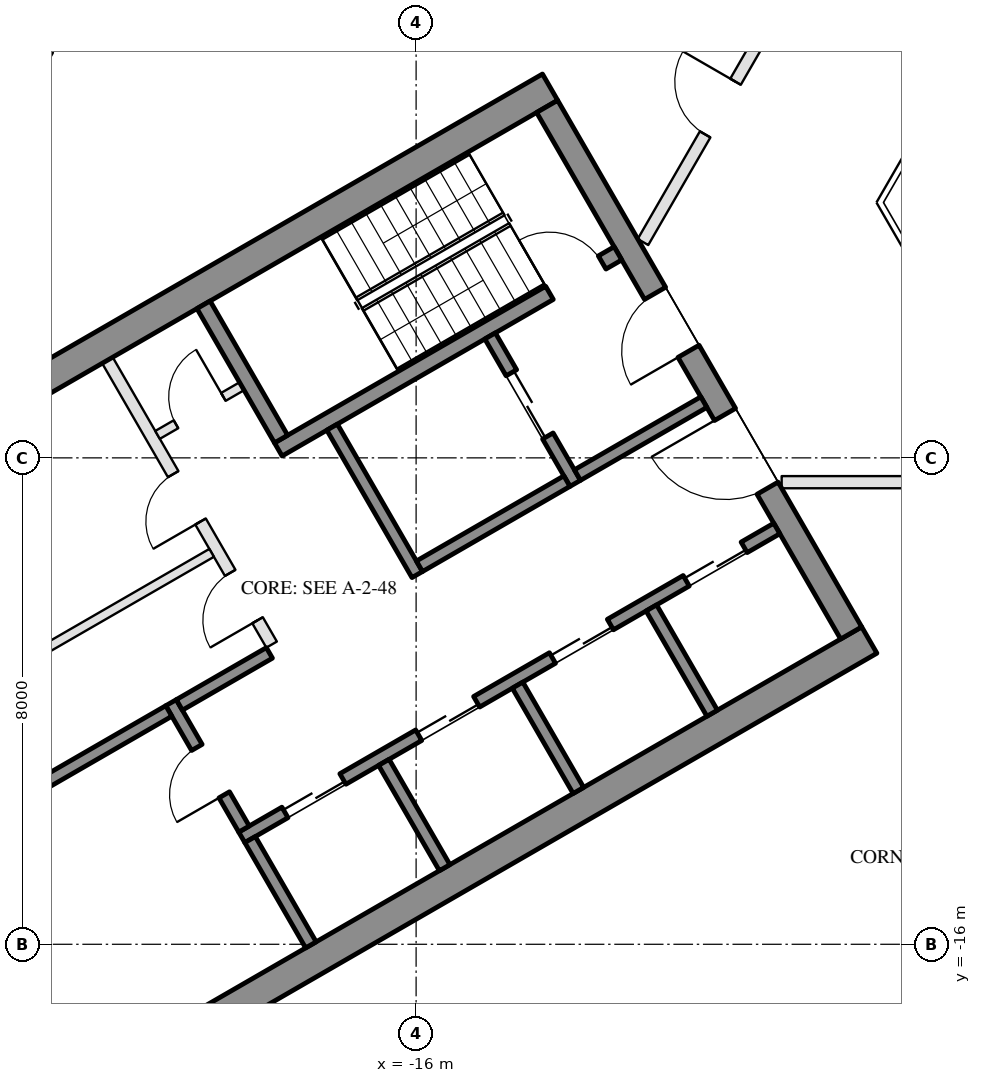
"""IFC4 building model, lengths in metres.
Left out: names, types, materials, properties, quantities, classifications, styles, units other than length and angle.
Written with IfcOpenShell. Run it as: python <this file> out.ifc"""

import sys

from ifc_helpers import new_model, si_unit, direction, frame, frame_2d, origin, place, context, subcontext, project, spatial, rectangle, extrude, element, fill, save


model = new_model("IFC4")
c1 = context("Model", 3, precision=1e-05, world=origin(), true_north=direction((0.0, 1.0)))
c2 = subcontext(c1, "Body", "Model", "MODEL_VIEW")
j1 = project(units=[si_unit("LENGTHUNIT", "METRE"), si_unit("PLANEANGLEUNIT", "RADIAN")], contexts=[c1])
p1 = place(None, origin())
s1 = spatial("IfcSite", under=j1, at=p1, CompositionType="ELEMENT")
p2 = place(p1, origin())
s2 = spatial("IfcBuilding", under=s1, at=p2, CompositionType="ELEMENT")
p3 = place(p2, frame((0.0, 0.0, 209.5)))
s3 = spatial("IfcBuildingStorey", under=s2, at=p3, CompositionType="ELEMENT", Elevation=209.5)
p4 = place(p3, frame((-20.309, 1.934, 0.0), z_axis=(0.0, 0.0, 1.0), x_axis=(-0.499992114976, -0.866029956157, 0.0)))
e1 = element("IfcWall", 1, at=p4, inside=s3, PredefinedType="SOLIDWALL", context=c2, shape_type="SweptSolid", body=[
    extrude(rectangle(XDim=6.74, YDim=0.35, at=frame_2d((3.37, 0.0))), origin(), (0.0, 0.0, 1.0), 3.55),
])
p5 = place(p4, frame((4.02, 0.0, 0.0)))
e2 = element("IfcOpeningElement", 2, at=p5, cuts=e1, PredefinedType="OPENING", context=c2, shape_type="SweptSolid", body=[
    extrude(rectangle(XDim=2.4, YDim=2.4, at=frame_2d((1.2, 1.2))), frame((0.0, 0.185, 0.0), z_axis=(0.0, -1.0, 0.0), x_axis=(1.0, 0.0, 0.0)), (0.0, 0.0, 1.0), 0.37),
])
p6 = place(p4, frame((0.77, 0.0, 0.3)))
e3 = element("IfcOpeningElement", 3, at=p6, cuts=e1, PredefinedType="OPENING", context=c2, shape_type="SweptSolid", body=[
    extrude(rectangle(XDim=2.9, YDim=2.65, at=frame_2d((1.45, 1.325))), frame((0.0, 0.185, 0.0), z_axis=(0.0, -1.0, 0.0), x_axis=(1.0, 0.0, 0.0)), (0.0, 0.0, 1.0), 0.37),
])
for number, where, z_axis, x_axis in (
    (4, (-13.797, -1.903, 0.0), (0.0, 0.0, 1.0), (-0.866, -0.5, 0.0)),
    (5, (-8.547, -10.997, 0.0), (0.0, 0.0, 1.0), (-0.866, -0.5, 0.0)),
):
    element("IfcWall", number, at=place(p3, frame(where, z_axis=z_axis, x_axis=x_axis)), inside=s3, PredefinedType="SHEAR", context=c2, shape_type="SweptSolid", body=[
        extrude(rectangle(XDim=14.837, YDim=0.5, at=frame_2d((7.418, 0.0))), origin(), (0.0, 0.0, 1.0), 3.5),
    ])
p7 = place(p3, frame((-13.845, -2.22, 0.0), z_axis=(0.0, 0.0, 1.0), x_axis=(0.500004234368, -0.866022959057, 0.0)))
e6 = element("IfcWall", 6, at=p7, inside=s3, PredefinedType="SHEAR", context=c2, shape_type="SweptSolid", body=[
    extrude(rectangle(XDim=10.0, YDim=0.4, at=frame_2d((5.0, 0.0))), origin(), (0.0, 0.0, 1.0), 3.5),
])
p8 = place(p7, frame((3.55, 0.0, 0.0)))
e7 = element("IfcOpeningElement", 7, at=p8, cuts=e6, PredefinedType="OPENING", context=c2, shape_type="SweptSolid", body=[
    extrude(rectangle(XDim=1.1, YDim=2.1, at=frame_2d((0.55, 1.05))), frame((0.0, 0.21, 0.0), z_axis=(0.0, -1.0, 0.0), x_axis=(1.0, 0.0, 0.0)), (0.0, 0.0, 1.0), 0.42),
])
p9 = place(p7, frame((5.85, 0.0, 0.0)))
e8 = element("IfcOpeningElement", 8, at=p9, cuts=e6, PredefinedType="OPENING", context=c2, shape_type="SweptSolid", body=[
    extrude(rectangle(XDim=1.4, YDim=2.1, at=frame_2d((0.7, 1.05))), frame((0.0, 0.21, 0.0), z_axis=(0.0, -1.0, 0.0), x_axis=(1.0, 0.0, 0.0)), (0.0, 0.0, 1.0), 0.42),
])
p10 = place(p3, frame((-12.681, -4.636, 0.0), z_axis=(0.0, 0.0, 1.0), x_axis=(-0.866021702275, -0.500006411147, 0.0)))
e9 = element("IfcWall", 9, at=p10, inside=s3, PredefinedType="SHEAR", context=c2, shape_type="SweptSolid", body=[
    extrude(rectangle(XDim=6.45, YDim=0.25, at=frame_2d((3.225, 0.0))), origin(), (0.0, 0.0, 1.0), 3.5),
])
p11 = place(p10, frame((0.3, 0.0, 0.0)))
e10 = element("IfcOpeningElement", 10, at=p11, cuts=e9, PredefinedType="OPENING", context=c2, shape_type="SweptSolid", body=[
    extrude(rectangle(XDim=1.0, YDim=2.1, at=frame_2d((0.5, 1.05))), frame((0.0, 0.135, 0.0), z_axis=(0.0, -1.0, 0.0), x_axis=(1.0, 0.0, 0.0)), (0.0, 0.0, 1.0), 0.27),
])
p12 = place(p3, frame((-19.496, -5.482, 0.0), z_axis=(0.0, 0.0, 1.0), x_axis=(0.499990435942, -0.866030925526, 0.0)))
e11 = element("IfcWall", 11, at=p12, inside=s3, PredefinedType="SHEAR", context=c2, shape_type="SweptSolid", body=[
    extrude(rectangle(XDim=2.55, YDim=0.25, at=frame_2d((1.275, 0.0))), origin(), (0.0, 0.0, 1.0), 3.5),
])
p13 = place(p3, frame((-17.381, -7.495, 0.0), z_axis=(0.0, 0.0, 1.0), x_axis=(0.500011755427, -0.866018616679, 0.0)))
e12 = element("IfcWall", 12, at=p13, inside=s3, PredefinedType="SHEAR", context=c2, shape_type="SweptSolid", body=[
    extrude(rectangle(XDim=2.8, YDim=0.2, at=frame_2d((1.4, 0.0))), origin(), (0.0, 0.0, 1.0), 3.5),
])
p14 = place(p3, frame((-14.783, -5.995, 0.0), z_axis=(0.0, 0.0, 1.0), x_axis=(0.49994636267, -0.866056369097, 0.0)))
e13 = element("IfcWall", 13, at=p14, inside=s3, PredefinedType="SHEAR", context=c2, shape_type="SweptSolid", body=[
    extrude(rectangle(XDim=2.8, YDim=0.2, at=frame_2d((1.4, 0.0))), origin(), (0.0, 0.0, 1.0), 3.5),
])
p15 = place(p14, frame((0.7, 0.0, 0.0)))
e14 = element("IfcOpeningElement", 14, at=p15, cuts=e13, PredefinedType="OPENING", context=c2, shape_type="SweptSolid", body=[
    extrude(rectangle(XDim=1.2, YDim=2.1, at=frame_2d((0.6, 1.05))), frame((0.0, 0.11, 0.0), z_axis=(0.0, -1.0, 0.0), x_axis=(1.0, 0.0, 0.0)), (0.0, 0.0, 1.0), 0.22),
])
p16 = place(p3, frame((-13.52, -8.383, 0.0), z_axis=(0.0, 0.0, 1.0), x_axis=(-0.866034573852, -0.49998411664, 0.0)))
e15 = element("IfcWall", 15, at=p16, inside=s3, PredefinedType="SHEAR", context=c2, shape_type="SweptSolid", body=[
    extrude(rectangle(XDim=2.8, YDim=0.2, at=frame_2d((1.4, 0.0))), origin(), (0.0, 0.0, 1.0), 3.5),
])
p17 = place(p3, frame((-11.268, -7.083, 0.0), z_axis=(0.0, 0.0, 1.0), x_axis=(-0.866050077142, -0.499957262057, 0.0)))
e16 = element("IfcWall", 16, at=p17, inside=s3, PredefinedType="SHEAR", context=c2, shape_type="SweptSolid", body=[
    extrude(rectangle(XDim=2.4, YDim=0.2, at=frame_2d((1.2, 0.0))), origin(), (0.0, 0.0, 1.0), 3.5),
])
p18 = place(p3, frame((-10.068, -9.162, 0.0), z_axis=(0.0, 0.0, 1.0), x_axis=(-0.866032725843, -0.499987317609, 0.0)))
e17 = element("IfcWall", 17, at=p18, inside=s3, PredefinedType="SHEAR", context=c2, shape_type="SweptSolid", body=[
    extrude(rectangle(XDim=10.16, YDim=0.2, at=frame_2d((5.08, 0.0))), origin(), (0.0, 0.0, 1.0), 3.5),
])
p19 = place(p18, frame((0.62, 0.0, 0.0)))
e18 = element("IfcOpeningElement", 18, at=p19, cuts=e17, PredefinedType="OPENING", context=c2, shape_type="SweptSolid", body=[
    extrude(rectangle(XDim=1.1, YDim=2.1, at=frame_2d((0.55, 1.05))), frame((0.0, 0.11, 0.0), z_axis=(0.0, -1.0, 0.0), x_axis=(1.0, 0.0, 0.0)), (0.0, 0.0, 1.0), 0.22),
])
p20 = place(p18, frame((3.16, 0.0, 0.0)))
e19 = element("IfcOpeningElement", 19, at=p20, cuts=e17, PredefinedType="OPENING", context=c2, shape_type="SweptSolid", body=[
    extrude(rectangle(XDim=1.1, YDim=2.1, at=frame_2d((0.55, 1.05))), frame((0.0, 0.11, 0.0), z_axis=(0.0, -1.0, 0.0), x_axis=(1.0, 0.0, 0.0)), (0.0, 0.0, 1.0), 0.22),
])
p21 = place(p18, frame((5.7, 0.0, 0.0)))
e20 = element("IfcOpeningElement", 20, at=p21, cuts=e17, PredefinedType="OPENING", context=c2, shape_type="SweptSolid", body=[
    extrude(rectangle(XDim=1.1, YDim=2.1, at=frame_2d((0.55, 1.05))), frame((0.0, 0.11, 0.0), z_axis=(0.0, -1.0, 0.0), x_axis=(1.0, 0.0, 0.0)), (0.0, 0.0, 1.0), 0.22),
])
p22 = place(p18, frame((8.24, 0.0, 0.0)))
e21 = element("IfcOpeningElement", 21, at=p22, cuts=e17, PredefinedType="OPENING", context=c2, shape_type="SweptSolid", body=[
    extrude(rectangle(XDim=1.1, YDim=2.1, at=frame_2d((0.55, 1.05))), frame((0.0, 0.11, 0.0), z_axis=(0.0, -1.0, 0.0), x_axis=(1.0, 0.0, 0.0)), (0.0, 0.0, 1.0), 0.22),
])
p23 = place(p3, frame((-20.031, -12.026, 0.0), z_axis=(0.0, 0.0, 1.0), x_axis=(0.500033551112, -0.866006032174, 0.0)))
e22 = element("IfcWall", 22, at=p23, inside=s3, PredefinedType="SHEAR", context=c2, shape_type="SweptSolid", body=[
    extrude(rectangle(XDim=2.4, YDim=0.2, at=frame_2d((1.2, 0.0))), origin(), (0.0, 0.0, 1.0), 3.5),
])
p24 = place(p23, frame((0.85, 0.0, 0.0)))
e23 = element("IfcOpeningElement", 23, at=p24, cuts=e22, PredefinedType="OPENING", context=c2, shape_type="SweptSolid", body=[
    extrude(rectangle(XDim=0.9, YDim=2.1, at=frame_2d((0.45, 1.05))), frame((0.0, 0.11, 0.0), z_axis=(0.0, -1.0, 0.0), x_axis=(1.0, 0.0, 0.0)), (0.0, 0.0, 1.0), 0.22),
])
p25 = place(p3, frame((-18.413, -11.208, 0.0), z_axis=(0.0, 0.0, 1.0), x_axis=(-0.866038183914, -0.499977863513, 0.0)))
e24 = element("IfcWall", 24, at=p25, inside=s3, PredefinedType="SHEAR", context=c2, shape_type="SweptSolid", body=[
    extrude(rectangle(XDim=1.71, YDim=0.2, at=frame_2d((0.855, 0.0))), origin(), (0.0, 0.0, 1.0), 3.5),
])
for number, where, z_axis, x_axis in (
    (25, (-12.131, -10.468, 0.0), (0.0, 0.0, 1.0), (0.5, -0.866, 0.0)),
    (26, (-14.331, -11.738, 0.0), (0.0, 0.0, 1.0), (0.5, -0.866, 0.0)),
    (27, (-16.531, -13.008, 0.0), (0.0, 0.0, 1.0), (0.5, -0.866, 0.0)),
    (28, (-18.73, -14.278, 0.0), (0.0, 0.0, 1.0), (0.5, -0.866, 0.0)),
):
    element("IfcWall", number, at=place(p3, frame(where, z_axis=z_axis, x_axis=x_axis)), inside=s3, PredefinedType="SHEAR", context=c2, shape_type="SweptSolid", body=[
        extrude(rectangle(XDim=2.0, YDim=0.2, at=frame_2d((1.0, 0.0))), origin(), (0.0, 0.0, 1.0), 3.5),
    ])
p26 = place(p3, frame((-20.067, -12.163, 0.0), z_axis=(0.0, 0.0, 1.0), x_axis=(-0.866055327414, -0.49994816717, 0.0)))
e29 = element("IfcWall", 29, at=p26, inside=s3, PredefinedType="SHEAR", context=c2, shape_type="SweptSolid", body=[
    extrude(rectangle(XDim=2.84, YDim=0.2, at=frame_2d((1.42, 0.0))), origin(), (0.0, 0.0, 1.0), 3.5),
])
p27 = place(p3, frame((-21.076, -6.395, 0.0), z_axis=(0.0, 0.0, 1.0), x_axis=(0.50001468107, -0.866016927499, 0.0)))
e30 = element("IfcWall", 30, at=p27, inside=s3, PredefinedType="PARTITIONING", context=c2, shape_type="SweptSolid", body=[
    extrude(rectangle(XDim=5.4, YDim=0.2, at=frame_2d((2.7, 0.0))), origin(), (0.0, 0.0, 1.0), 3.5),
])
p28 = place(p27, frame((2.163, 0.0, 0.0)))
e31 = element("IfcOpeningElement", 31, at=p28, cuts=e30, PredefinedType="OPENING", context=c2, shape_type="SweptSolid", body=[
    extrude(rectangle(XDim=0.9, YDim=2.1, at=frame_2d((0.45, 1.05))), frame((0.0, 0.11, 0.0), z_axis=(0.0, -1.0, 0.0), x_axis=(1.0, 0.0, 0.0)), (0.0, 0.0, 1.0), 0.22),
])
p29 = place(p27, frame((4.038, 0.0, 0.0)))
e32 = element("IfcOpeningElement", 32, at=p29, cuts=e30, PredefinedType="OPENING", context=c2, shape_type="SweptSolid", body=[
    extrude(rectangle(XDim=0.9, YDim=2.1, at=frame_2d((0.45, 1.05))), frame((0.0, 0.11, 0.0), z_axis=(0.0, -1.0, 0.0), x_axis=(1.0, 0.0, 0.0)), (0.0, 0.0, 1.0), 0.22),
])
p30 = place(p3, frame((-18.866, -6.822, 0.0), z_axis=(0.0, 0.0, 1.0), x_axis=(-0.866028054938, -0.499995408039, 0.0)))
e33 = element("IfcWall", 33, at=p30, inside=s3, PredefinedType="PARTITIONING", context=c2, shape_type="SweptSolid", body=[
    extrude(rectangle(XDim=1.6, YDim=0.15, at=frame_2d((0.8, 0.0))), origin(), (0.0, 0.0, 1.0), 3.5),
])
p31 = place(p30, frame((0.35, 0.0, 0.0)))
e34 = element("IfcOpeningElement", 34, at=p31, cuts=e33, PredefinedType="OPENING", context=c2, shape_type="SweptSolid", body=[
    extrude(rectangle(XDim=0.9, YDim=2.1, at=frame_2d((0.45, 1.05))), frame((0.0, 0.085, 0.0), z_axis=(0.0, -1.0, 0.0), x_axis=(1.0, 0.0, 0.0)), (0.0, 0.0, 1.0), 0.17),
])
p32 = place(p3, frame((-19.363, -9.562, 0.0), z_axis=(0.0, 0.0, 1.0), x_axis=(-0.866016523273, -0.500015381182, 0.0)))
e35 = element("IfcWall", 35, at=p32, inside=s3, PredefinedType="PARTITIONING", context=c2, shape_type="SweptSolid", body=[
    extrude(rectangle(XDim=6.95, YDim=0.15, at=frame_2d((3.475, 0.0))), origin(), (0.0, 0.0, 1.0), 3.5),
])
p33 = place(p3, frame((-2.4, -8.4, 0.0), z_axis=(0.0, 0.0, 1.0), x_axis=(-1.0, 0.0, 0.0)))
e36 = element("IfcWall", 36, at=p33, inside=s3, PredefinedType="PARTITIONING", context=c2, shape_type="SweptSolid", body=[
    extrude(rectangle(XDim=7.588, YDim=0.2, at=frame_2d((3.794, 0.0))), origin(), (0.0, 0.0, 1.0), 2.95),
])
p34 = place(p33, frame((3.294, 0.0, 0.0)))
e37 = element("IfcOpeningElement", 37, at=p34, cuts=e36, PredefinedType="OPENING", context=c2, shape_type="SweptSolid", body=[
    extrude(rectangle(XDim=1.0, YDim=2.1, at=frame_2d((0.5, 1.05))), frame((0.0, 0.11, 0.0), z_axis=(0.0, -1.0, 0.0), x_axis=(1.0, 0.0, 0.0)), (0.0, 0.0, 1.0), 0.22),
])
p35 = place(p3, frame((-12.269, -4.45, 0.0), z_axis=(0.0, 0.0, 1.0), x_axis=(0.500014573982, 0.866016989329, 0.0)))
e38 = element("IfcWall", 38, at=p35, inside=s3, PredefinedType="PARTITIONING", context=c2, shape_type="SweptSolid", body=[
    extrude(rectangle(XDim=5.088, YDim=0.2, at=frame_2d((2.544, 0.0))), origin(), (0.0, 0.0, 1.0), 2.95),
])
p36 = place(p35, frame((2.044, 0.0, 0.0)))
e39 = element("IfcOpeningElement", 39, at=p36, cuts=e38, PredefinedType="OPENING", context=c2, shape_type="SweptSolid", body=[
    extrude(rectangle(XDim=1.0, YDim=2.1, at=frame_2d((0.5, 1.05))), frame((0.0, 0.11, 0.0), z_axis=(0.0, -1.0, 0.0), x_axis=(1.0, 0.0, 0.0)), (0.0, 0.0, 1.0), 0.22),
])
p37 = place(p15, origin())
e40 = element("IfcDoor", 40, at=p37, inside=s3, OperationType="DOUBLE_DOOR_SLIDING", PredefinedType="DOOR", context=c2, shape_type="SweptSolid", body=[
    extrude(rectangle(XDim=1.2, YDim=2.1, at=frame_2d((0.6, 1.05))), frame((0.0, 0.025, 0.0), z_axis=(0.0, -1.0, 0.0), x_axis=(1.0, 0.0, 0.0)), (0.0, 0.0, 1.0), 0.05),
])
fill(e14, e40)
p38 = place(p31, frame((0.9, 0.0, 0.0), z_axis=(0.0, 0.0, 1.0), x_axis=(-1.0, 0.0, 0.0)))
e41 = element("IfcDoor", 41, at=p38, inside=s3, OperationType="SINGLE_SWING_RIGHT", PredefinedType="DOOR", context=c2, shape_type="SweptSolid", body=[
    extrude(rectangle(XDim=0.9, YDim=2.1, at=frame_2d((0.45, 1.05))), frame((0.0, 0.025, 0.0), z_axis=(0.0, -1.0, 0.0), x_axis=(1.0, 0.0, 0.0)), (0.0, 0.0, 1.0), 0.05),
])
fill(e34, e41)
p39 = place(p19, origin())
e42 = element("IfcDoor", 42, at=p39, inside=s3, OperationType="DOUBLE_DOOR_SLIDING", PredefinedType="DOOR", context=c2, shape_type="SweptSolid", body=[
    extrude(rectangle(XDim=1.1, YDim=2.1, at=frame_2d((0.55, 1.05))), frame((0.0, 0.025, 0.0), z_axis=(0.0, -1.0, 0.0), x_axis=(1.0, 0.0, 0.0)), (0.0, 0.0, 1.0), 0.05),
])
fill(e18, e42)
p40 = place(p20, origin())
e43 = element("IfcDoor", 43, at=p40, inside=s3, OperationType="DOUBLE_DOOR_SLIDING", PredefinedType="DOOR", context=c2, shape_type="SweptSolid", body=[
    extrude(rectangle(XDim=1.1, YDim=2.1, at=frame_2d((0.55, 1.05))), frame((0.0, 0.025, 0.0), z_axis=(0.0, -1.0, 0.0), x_axis=(1.0, 0.0, 0.0)), (0.0, 0.0, 1.0), 0.05),
])
fill(e19, e43)
p41 = place(p21, origin())
e44 = element("IfcDoor", 44, at=p41, inside=s3, OperationType="DOUBLE_DOOR_SLIDING", PredefinedType="DOOR", context=c2, shape_type="SweptSolid", body=[
    extrude(rectangle(XDim=1.1, YDim=2.1, at=frame_2d((0.55, 1.05))), frame((0.0, 0.025, 0.0), z_axis=(0.0, -1.0, 0.0), x_axis=(1.0, 0.0, 0.0)), (0.0, 0.0, 1.0), 0.05),
])
fill(e20, e44)
p42 = place(p22, origin())
e45 = element("IfcDoor", 45, at=p42, inside=s3, OperationType="DOUBLE_DOOR_SLIDING", PredefinedType="DOOR", context=c2, shape_type="SweptSolid", body=[
    extrude(rectangle(XDim=1.1, YDim=2.1, at=frame_2d((0.55, 1.05))), frame((0.0, 0.025, 0.0), z_axis=(0.0, -1.0, 0.0), x_axis=(1.0, 0.0, 0.0)), (0.0, 0.0, 1.0), 0.05),
])
fill(e21, e45)
p43 = place(p24, frame((0.9, 0.0, 0.0), z_axis=(0.0, 0.0, 1.0), x_axis=(-1.0, 0.0, 0.0)))
e46 = element("IfcDoor", 46, at=p43, inside=s3, OperationType="SINGLE_SWING_LEFT", PredefinedType="DOOR", context=c2, shape_type="SweptSolid", body=[
    extrude(rectangle(XDim=0.9, YDim=2.1, at=frame_2d((0.45, 1.05))), frame((0.0, 0.025, 0.0), z_axis=(0.0, -1.0, 0.0), x_axis=(1.0, 0.0, 0.0)), (0.0, 0.0, 1.0), 0.05),
])
fill(e23, e46)
p44 = place(p28, frame((0.9, 0.0, 0.0), z_axis=(0.0, 0.0, 1.0), x_axis=(-1.0, 0.0, 0.0)))
e47 = element("IfcDoor", 47, at=p44, inside=s3, OperationType="SINGLE_SWING_LEFT", PredefinedType="DOOR", context=c2, shape_type="SweptSolid", body=[
    extrude(rectangle(XDim=0.9, YDim=2.1, at=frame_2d((0.45, 1.05))), frame((0.0, 0.025, 0.0), z_axis=(0.0, -1.0, 0.0), x_axis=(1.0, 0.0, 0.0)), (0.0, 0.0, 1.0), 0.05),
])
fill(e31, e47)
p45 = place(p29, frame((0.9, 0.0, 0.0), z_axis=(0.0, 0.0, 1.0), x_axis=(-1.0, 0.0, 0.0)))
e48 = element("IfcDoor", 48, at=p45, inside=s3, OperationType="SINGLE_SWING_LEFT", PredefinedType="DOOR", context=c2, shape_type="SweptSolid", body=[
    extrude(rectangle(XDim=0.9, YDim=2.1, at=frame_2d((0.45, 1.05))), frame((0.0, 0.025, 0.0), z_axis=(0.0, -1.0, 0.0), x_axis=(1.0, 0.0, 0.0)), (0.0, 0.0, 1.0), 0.05),
])
fill(e32, e48)
p46 = place(p8, frame((1.1, 0.0, 0.0), z_axis=(0.0, 0.0, 1.0), x_axis=(-1.0, 0.0, 0.0)))
e49 = element("IfcDoor", 49, at=p46, inside=s3, OperationType="SINGLE_SWING_LEFT", PredefinedType="DOOR", context=c2, shape_type="SweptSolid", body=[
    extrude(rectangle(XDim=1.1, YDim=2.1, at=frame_2d((0.55, 1.05))), frame((0.0, 0.025, 0.0), z_axis=(0.0, -1.0, 0.0), x_axis=(1.0, 0.0, 0.0)), (0.0, 0.0, 1.0), 0.05),
])
fill(e7, e49)
p47 = place(p9, frame((1.4, 0.0, 0.0), z_axis=(0.0, 0.0, 1.0), x_axis=(-1.0, 0.0, 0.0)))
e50 = element("IfcDoor", 50, at=p47, inside=s3, OperationType="DOUBLE_DOOR_SINGLE_SWING", PredefinedType="DOOR", context=c2, shape_type="SweptSolid", body=[
    extrude(rectangle(XDim=1.4, YDim=2.1, at=frame_2d((0.7, 1.05))), frame((0.0, 0.025, 0.0), z_axis=(0.0, -1.0, 0.0), x_axis=(1.0, 0.0, 0.0)), (0.0, 0.0, 1.0), 0.05),
])
fill(e8, e50)
p48 = place(p11, frame((1.0, 0.0, 0.0), z_axis=(0.0, 0.0, 1.0), x_axis=(-1.0, 0.0, 0.0)))
e51 = element("IfcDoor", 51, at=p48, inside=s3, OperationType="SINGLE_SWING_LEFT", PredefinedType="DOOR", context=c2, shape_type="SweptSolid", body=[
    extrude(rectangle(XDim=1.0, YDim=2.1, at=frame_2d((0.5, 1.05))), frame((0.0, 0.025, 0.0), z_axis=(0.0, -1.0, 0.0), x_axis=(1.0, 0.0, 0.0)), (0.0, 0.0, 1.0), 0.05),
])
fill(e10, e51)
p49 = place(p36, origin())
e52 = element("IfcDoor", 52, at=p49, inside=s3, OperationType="SINGLE_SWING_RIGHT", PredefinedType="DOOR", context=c2, shape_type="SweptSolid", body=[
    extrude(rectangle(XDim=1.0, YDim=2.1, at=frame_2d((0.5, 1.05))), frame((0.0, 0.025, 0.0), z_axis=(0.0, -1.0, 0.0), x_axis=(1.0, 0.0, 0.0)), (0.0, 0.0, 1.0), 0.05),
])
fill(e39, e52)
save(model, sys.argv[1])
